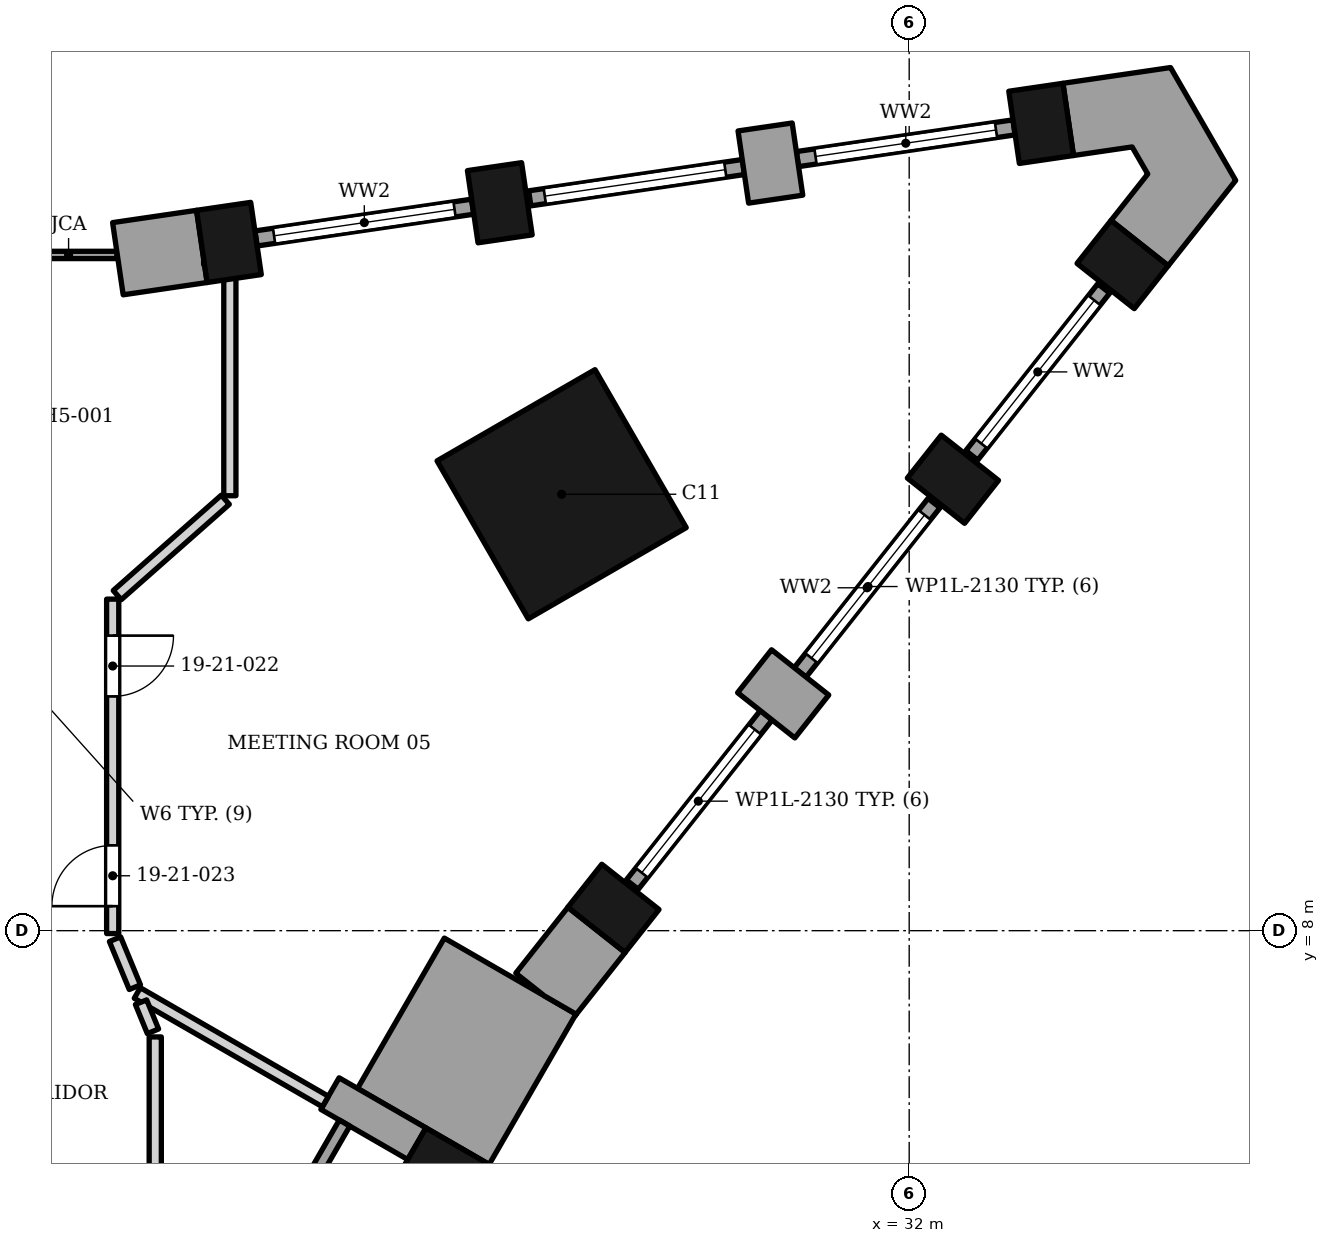
"""IFC4 building model, lengths in metres.
Left out: names, types, materials, properties, quantities, classifications, styles, units other than length and angle.
Written with IfcOpenShell. Run it as: python <this file> out.ifc"""

import sys

from ifc_helpers import new_model, si_unit, direction, frame, frame_2d, origin, origin_2d, place, context, subcontext, project, spatial, polyline, rectangle, outline, extrude, element, fill, save


model = new_model("IFC4")
c1 = context("Model", 3, precision=1e-05, world=origin(), true_north=direction((0.0, 1.0)))
c2 = subcontext(c1, "Body", "Model", "MODEL_VIEW")
j1 = project(units=[si_unit("LENGTHUNIT", "METRE"), si_unit("PLANEANGLEUNIT", "RADIAN")], contexts=[c1])
p1 = place(None, origin())
s1 = spatial("IfcSite", under=j1, at=p1, CompositionType="ELEMENT")
p2 = place(p1, origin())
s2 = spatial("IfcBuilding", under=s1, at=p2, CompositionType="ELEMENT")
p3 = place(p2, frame((0.0, 0.0, 91.8)))
s3 = spatial("IfcBuildingStorey", under=s2, at=p3, CompositionType="ELEMENT", Elevation=91.8)
p4 = place(p3, frame((26.284, 15.177, 0.0), z_axis=(0.0, 0.0, 1.0), x_axis=(-0.866025438691, -0.49999993954, 0.0)))
e1 = element("IfcColumn", 1, at=p4, inside=s3, PredefinedType="COLUMN", context=c2, shape_type="SweptSolid", body=[
    extrude(rectangle(XDim=3.0, YDim=3.0, at=origin_2d()), origin(), (0.0, 0.0, 1.0), 3.4),
])
for number, where, z_axis, x_axis in (
    (2, (24.347, 4.066, 0.0), (0.0, 0.0, 1.0), (0.5, 0.866, 0.0)),
    (3, (27.136, 8.367, 0.0), (0.0, 0.0, 1.0), (0.62, 0.784, 0.0)),
    (4, (32.719, 15.424, 0.0), (0.0, 0.0, 1.0), (0.62, 0.784, 0.0)),
    (5, (35.51, 18.954, 0.0), (0.0, 0.0, 1.0), (0.62, 0.784, 0.0)),
    (6, (34.17, 21.276, 0.0), (0.0, 0.0, 1.0), (-0.989, -0.145, 0.0)),
    (7, (25.267, 19.971, 0.0), (0.0, 0.0, 1.0), (-0.989, -0.145, 0.0)),
    (8, (20.812, 19.318, 0.0), (0.0, 0.0, 1.0), (-0.989, -0.145, 0.0)),
):
    element("IfcColumn", number, at=place(p3, frame(where, z_axis=z_axis, x_axis=x_axis)), inside=s3, PredefinedType="COLUMN", context=c2, shape_type="SweptSolid", body=[
        extrude(rectangle(XDim=0.9, YDim=1.2, at=origin_2d()), origin(), (0.0, 0.0, 1.0), 3.4),
    ])
p5 = place(p3, frame((22.474, 5.321, 0.0), z_axis=(0.0, 0.0, 1.0), x_axis=(0.866040211805, -0.499974350878, 0.0)))
e9 = element("IfcWall", 9, at=p5, inside=s3, PredefinedType="SOLIDWALL", context=c2, shape_type="SweptSolid", body=[
    extrude(rectangle(XDim=1.65, YDim=0.6, at=frame_2d((0.825, 0.0))), origin(), (0.0, 0.0, 1.0), 2.45),
])
p6 = place(p3, frame((20.614, 1.199, 0.0), z_axis=(0.0, 0.0, 1.0), x_axis=(0.500027713859, 0.866009402589, 0.0)))
e10 = element("IfcWall", 10, at=p6, inside=s3, PredefinedType="ELEMENTEDWALL", context=c2, shape_type="SweptSolid", body=[
    extrude(rectangle(XDim=4.2, YDim=0.2, at=frame_2d((2.1, 0.0))), origin(), (0.0, 0.0, 1.0), 2.45),
])
p7 = place(p3, origin())
e11 = element("IfcWall", 11, at=p7, inside=s3, PredefinedType="SOLIDWALL", context=c2, shape_type="SweptSolid", body=[
    extrude(outline(polyline([(22.927, 5.406), (25.092, 4.156), (26.52, 6.628), (24.354, 7.878), (22.927, 5.406)])), origin(), (0.0, 0.0, 1.0), 2.63),
])
p8 = place(p3, frame((30.398, 11.522, 0.0), z_axis=(0.0, 0.0, 1.0), x_axis=(-0.784330409431, 0.620343299184, 0.0)))
e12 = element("IfcWall", 12, at=p8, inside=s3, PredefinedType="SOLIDWALL", context=c2, shape_type="SweptSolid", body=[
    extrude(rectangle(XDim=1.2, YDim=0.9, at=frame_2d((0.6, 0.0))), origin(), (0.0, 0.0, 1.0), 2.63),
])
p9 = place(p3, frame((27.447, 8.757, 0.0), z_axis=(0.0, 0.0, 1.0), x_axis=(0.620259189042, 0.784396926568, 0.0)))
e13 = element("IfcWall", 13, at=p9, inside=s3, PredefinedType="ELEMENTEDWALL", context=c2, shape_type="SweptSolid", body=[
    extrude(rectangle(XDim=3.552, YDim=0.25, at=frame_2d((1.776, 0.0))), origin(), (0.0, 0.0, 1.0), 2.63),
])
p10 = place(p9, frame((0.25, 0.0, 0.3)))
e14 = element("IfcOpeningElement", 14, at=p10, cuts=e13, PredefinedType="OPENING", context=c2, shape_type="SweptSolid", body=[
    extrude(rectangle(XDim=3.0, YDim=2.13, at=frame_2d((1.5, 1.065))), frame((0.0, 0.135, 0.0), z_axis=(0.0, -1.0, 0.0), x_axis=(1.0, 0.0, 0.0)), (0.0, 0.0, 1.0), 0.27),
])
p11 = place(p3, frame((30.206, 12.246, 0.0), z_axis=(0.0, 0.0, 1.0), x_axis=(0.620334919108, 0.784337037335, 0.0)))
e15 = element("IfcWall", 15, at=p11, inside=s3, PredefinedType="ELEMENTEDWALL", context=c2, shape_type="SweptSolid", body=[
    extrude(rectangle(XDim=3.552, YDim=0.25, at=frame_2d((1.776, 0.0))), origin(), (0.0, 0.0, 1.0), 2.63),
])
p12 = place(p11, frame((0.302, 0.0, 0.3)))
e16 = element("IfcOpeningElement", 16, at=p12, cuts=e15, PredefinedType="OPENING", context=c2, shape_type="SweptSolid", body=[
    extrude(rectangle(XDim=3.0, YDim=2.13, at=frame_2d((1.5, 1.065))), frame((0.0, 0.135, 0.0), z_axis=(0.0, -1.0, 0.0), x_axis=(1.0, 0.0, 0.0)), (0.0, 0.0, 1.0), 0.27),
])
p13 = place(p3, frame((33.029, 15.816, 0.0), z_axis=(0.0, 0.0, 1.0), x_axis=(0.620304451578, 0.78436113325, 0.0)))
e17 = element("IfcWall", 17, at=p13, inside=s3, PredefinedType="ELEMENTEDWALL", context=c2, shape_type="SweptSolid", body=[
    extrude(rectangle(XDim=3.5, YDim=0.25, at=frame_2d((1.75, 0.0))), origin(), (0.0, 0.0, 1.0), 2.63),
])
p14 = place(p13, frame((0.25, 0.0, 0.3)))
e18 = element("IfcOpeningElement", 18, at=p14, cuts=e17, PredefinedType="OPENING", context=c2, shape_type="SweptSolid", body=[
    extrude(rectangle(XDim=3.0, YDim=2.13, at=frame_2d((1.5, 1.065))), frame((0.0, 0.135, 0.0), z_axis=(0.0, -1.0, 0.0), x_axis=(1.0, 0.0, 0.0)), (0.0, 0.0, 1.0), 0.27),
])
p15 = place(p3, frame((29.63, 21.217, 0.0), z_axis=(0.0, 0.0, 1.0), x_axis=(0.144867198998, -0.989451107764, 0.0)))
e19 = element("IfcWall", 19, at=p15, inside=s3, PredefinedType="SOLIDWALL", context=c2, shape_type="SweptSolid", body=[
    extrude(rectangle(XDim=1.2, YDim=0.9, at=frame_2d((0.6, 0.0))), origin(), (0.0, 0.0, 1.0), 2.63),
])
p16 = place(p3, frame((33.725, 21.211, 0.0), z_axis=(0.0, 0.0, 1.0), x_axis=(-0.98942335115, -0.145056651687, 0.0)))
e20 = element("IfcWall", 20, at=p16, inside=s3, PredefinedType="ELEMENTEDWALL", context=c2, shape_type="SweptSolid", body=[
    extrude(rectangle(XDim=3.6, YDim=0.25, at=frame_2d((1.8, 0.0))), origin(), (0.0, 0.0, 1.0), 2.63),
])
p17 = place(p16, frame((0.3, 0.0, 0.3)))
e21 = element("IfcOpeningElement", 21, at=p17, cuts=e20, PredefinedType="OPENING", context=c2, shape_type="SweptSolid", body=[
    extrude(rectangle(XDim=3.0, YDim=2.13, at=frame_2d((1.5, 1.065))), frame((0.0, 0.135, 0.0), z_axis=(0.0, -1.0, 0.0), x_axis=(1.0, 0.0, 0.0)), (0.0, 0.0, 1.0), 0.27),
])
p18 = place(p3, frame((29.274, 20.558, 0.0), z_axis=(0.0, 0.0, 1.0), x_axis=(-0.989427410985, -0.145028957081, 0.0)))
e22 = element("IfcWall", 22, at=p18, inside=s3, PredefinedType="ELEMENTEDWALL", context=c2, shape_type="SweptSolid", body=[
    extrude(rectangle(XDim=3.552, YDim=0.25, at=frame_2d((1.776, 0.0))), origin(), (0.0, 0.0, 1.0), 2.63),
])
p19 = place(p18, frame((0.302, 0.0, 0.3)))
e23 = element("IfcOpeningElement", 23, at=p19, cuts=e22, PredefinedType="OPENING", context=c2, shape_type="SweptSolid", body=[
    extrude(rectangle(XDim=3.0, YDim=2.13, at=frame_2d((1.5, 1.065))), frame((0.0, 0.135, 0.0), z_axis=(0.0, -1.0, 0.0), x_axis=(1.0, 0.0, 0.0)), (0.0, 0.0, 1.0), 0.27),
])
p20 = place(p3, frame((24.82, 19.906, 0.0), z_axis=(0.0, 0.0, 1.0), x_axis=(-0.989433082017, -0.144990262464, 0.0)))
e24 = element("IfcWall", 24, at=p20, inside=s3, PredefinedType="ELEMENTEDWALL", context=c2, shape_type="SweptSolid", body=[
    extrude(rectangle(XDim=3.6, YDim=0.25, at=frame_2d((1.8, 0.0))), origin(), (0.0, 0.0, 1.0), 2.63),
])
p21 = place(p20, frame((0.3, 0.0, 0.3)))
e25 = element("IfcOpeningElement", 25, at=p21, cuts=e24, PredefinedType="OPENING", context=c2, shape_type="SweptSolid", body=[
    extrude(rectangle(XDim=3.0, YDim=2.13, at=frame_2d((1.5, 1.065))), frame((0.0, 0.135, 0.0), z_axis=(0.0, -1.0, 0.0), x_axis=(1.0, 0.0, 0.0)), (0.0, 0.0, 1.0), 0.27),
])
p22 = place(p3, origin())
e26 = element("IfcWall", 26, at=p22, inside=s3, PredefinedType="SOLIDWALL", context=c2, shape_type="SweptSolid", body=[
    extrude(outline(polyline([(26.386, 8.384), (25.529, 7.3), (26.0, 6.928), (26.52, 6.628), (26.498, 6.59), (27.328, 7.64), (26.386, 8.384)])), origin(), (0.0, 0.0, 1.0), 2.63),
])
p23 = place(p3, origin())
e27 = element("IfcWall", 27, at=p23, inside=s3, PredefinedType="SOLIDWALL", context=c2, shape_type="SweptSolid", body=[
    extrude(outline(polyline([(35.923, 20.443), (35.319, 19.679), (36.26, 18.935), (37.37, 20.338), (36.298, 22.194), (34.528, 21.935), (34.702, 20.748), (35.666, 20.889), (35.923, 20.443)])), origin(), (0.0, 0.0, 1.0), 2.65),
])
p24 = place(p3, frame((18.986, 19.051, 0.0), z_axis=(0.0, 0.0, 1.0), x_axis=(0.989435994601, 0.144970385211, 0.0)))
e28 = element("IfcWall", 28, at=p24, inside=s3, PredefinedType="SOLIDWALL", context=c2, shape_type="SweptSolid", body=[
    extrude(rectangle(XDim=1.396, YDim=1.2, at=frame_2d((0.698, 0.0))), origin(), (0.0, 0.0, 1.0), 2.65),
])
p25 = place(p3, frame((17.38, 19.113, 0.0), z_axis=(0.0, 0.0, 1.0), x_axis=(1.0, 0.0, 0.0)))
e29 = element("IfcWall", 29, at=p25, inside=s3, PredefinedType="SOLIDWALL", context=c2, shape_type="SweptSolid", body=[
    extrude(rectangle(XDim=1.59, YDim=0.12, at=frame_2d((0.795, 0.0))), origin(), (0.0, 0.0, 1.0), 2.65),
])
p26 = place(p3, frame((19.305, 6.975, 0.0), z_axis=(0.0, 0.0, 1.0), x_axis=(0.866254994177, -0.499602126761, 0.0)))
e30 = element("IfcWall", 30, at=p26, inside=s3, PredefinedType="PARTITIONING", context=c2, shape_type="SweptSolid", body=[
    extrude(rectangle(XDim=3.572, YDim=0.2, at=frame_2d((1.786, 0.0))), origin(), (0.0, 0.0, 1.0), 2.552),
])
p27 = place(p3, frame((19.6, 3.9, 0.0), z_axis=(0.0, 0.0, 1.0), x_axis=(0.000103755965, 0.999999994617, 0.0)))
e31 = element("IfcWall", 31, at=p27, inside=s3, PredefinedType="PARTITIONING", context=c2, shape_type="SweptSolid", body=[
    extrude(rectangle(XDim=2.353, YDim=0.2, at=frame_2d((1.177, 0.0))), origin(), (0.0, 0.0, 1.0), 2.45),
])
p28 = place(p3, frame((19.366, 6.824, 0.0), z_axis=(0.0, 0.0, 1.0), x_axis=(0.378945204734, -0.925419111435, 0.0)))
e32 = element("IfcWall", 32, at=p28, inside=s3, PredefinedType="PARTITIONING", context=c2, shape_type="SweptSolid", body=[
    extrude(rectangle(XDim=0.517, YDim=0.2, at=frame_2d((0.259, 0.0))), origin(), (0.0, 0.0, 1.0), 3.23),
])
p29 = place(p3, frame((18.939, 7.86, 0.0), z_axis=(0.0, 0.0, 1.0), x_axis=(0.382057312896, -0.924138631193, 0.0)))
e33 = element("IfcWall", 33, at=p29, inside=s3, PredefinedType="PARTITIONING", context=c2, shape_type="SweptSolid", body=[
    extrude(rectangle(XDim=0.854, YDim=0.2, at=frame_2d((0.427, 0.0))), origin(), (0.0, 0.0, 1.0), 3.23),
])
p30 = place(p3, frame((18.9, 7.953, 0.0), z_axis=(0.0, 0.0, 1.0), x_axis=(0.0, 1.0, 0.0)))
e34 = element("IfcWall", 34, at=p30, inside=s3, PredefinedType="PARTITIONING", context=c2, shape_type="SweptSolid", body=[
    extrude(rectangle(XDim=5.5, YDim=0.2, at=frame_2d((2.75, 0.0))), origin(), (0.0, 0.0, 1.0), 3.23),
])
p31 = place(p30, frame((3.899, 0.0, 0.0)))
e35 = element("IfcOpeningElement", 35, at=p31, cuts=e34, PredefinedType="OPENING", context=c2, shape_type="SweptSolid", body=[
    extrude(rectangle(XDim=1.0, YDim=2.1, at=frame_2d((0.5, 1.05))), frame((0.0, 0.11, 0.0), z_axis=(0.0, -1.0, 0.0), x_axis=(1.0, 0.0, 0.0)), (0.0, 0.0, 1.0), 0.22),
])
p32 = place(p30, frame((0.45, 0.0, 0.0)))
e36 = element("IfcOpeningElement", 36, at=p32, cuts=e34, PredefinedType="OPENING", context=c2, shape_type="SweptSolid", body=[
    extrude(rectangle(XDim=1.0, YDim=2.1, at=frame_2d((0.5, 1.05))), frame((0.0, 0.11, 0.0), z_axis=(0.0, -1.0, 0.0), x_axis=(1.0, 0.0, 0.0)), (0.0, 0.0, 1.0), 0.22),
])
p33 = place(p3, frame((18.976, 13.519, 0.0), z_axis=(0.0, 0.0, 1.0), x_axis=(0.749825828818, 0.661635266924, 0.0)))
e37 = element("IfcWall", 37, at=p33, inside=s3, PredefinedType="PARTITIONING", context=c2, shape_type="SweptSolid", body=[
    extrude(rectangle(XDim=2.37, YDim=0.2, at=frame_2d((1.185, 0.0))), origin(), (0.0, 0.0, 1.0), 3.23),
])
p34 = place(p3, frame((20.396, 19.053, 0.0), z_axis=(0.0, 0.0, 1.0), x_axis=(1.0, 0.0, 0.0)))
e38 = element("IfcWall", 38, at=p34, inside=s3, PredefinedType="PARTITIONING", context=c2, shape_type="SweptSolid", body=[
    extrude(rectangle(XDim=0.331, YDim=0.2, at=frame_2d((0.166, 0.0))), origin(), (0.0, 0.0, 1.0), 3.23),
])
p35 = place(p3, frame((20.827, 19.053, 0.0), z_axis=(0.0, 0.0, 1.0), x_axis=(0.0, -1.0, 0.0)))
e39 = element("IfcWall", 39, at=p35, inside=s3, PredefinedType="PARTITIONING", context=c2, shape_type="SweptSolid", body=[
    extrude(rectangle(XDim=3.9, YDim=0.2, at=frame_2d((1.95, 0.0))), origin(), (0.0, 0.0, 1.0), 3.23),
])
p36 = place(p10, origin())
e40 = element("IfcWindow", 40, at=p36, inside=s3, PartitioningType="SINGLE_PANEL", PredefinedType="WINDOW", context=c2, shape_type="SweptSolid", body=[
    extrude(rectangle(XDim=3.0, YDim=2.13, at=frame_2d((1.5, 1.065))), frame((0.0, 0.03, 0.0), z_axis=(0.0, -1.0, 0.0), x_axis=(1.0, 0.0, 0.0)), (0.0, 0.0, 1.0), 0.06),
])
fill(e14, e40)
p37 = place(p12, origin())
e41 = element("IfcWindow", 41, at=p37, inside=s3, PartitioningType="SINGLE_PANEL", PredefinedType="WINDOW", context=c2, shape_type="SweptSolid", body=[
    extrude(rectangle(XDim=3.0, YDim=2.13, at=frame_2d((1.5, 1.065))), frame((0.0, 0.03, 0.0), z_axis=(0.0, -1.0, 0.0), x_axis=(1.0, 0.0, 0.0)), (0.0, 0.0, 1.0), 0.06),
])
fill(e16, e41)
p38 = place(p14, origin())
e42 = element("IfcWindow", 42, at=p38, inside=s3, PartitioningType="SINGLE_PANEL", PredefinedType="WINDOW", context=c2, shape_type="SweptSolid", body=[
    extrude(rectangle(XDim=3.0, YDim=2.13, at=frame_2d((1.5, 1.065))), frame((0.0, 0.03, 0.0), z_axis=(0.0, -1.0, 0.0), x_axis=(1.0, 0.0, 0.0)), (0.0, 0.0, 1.0), 0.06),
])
fill(e18, e42)
p39 = place(p17, origin())
e43 = element("IfcWindow", 43, at=p39, inside=s3, PartitioningType="SINGLE_PANEL", PredefinedType="WINDOW", context=c2, shape_type="SweptSolid", body=[
    extrude(rectangle(XDim=3.0, YDim=2.13, at=frame_2d((1.5, 1.065))), frame((0.0, 0.03, 0.0), z_axis=(0.0, -1.0, 0.0), x_axis=(1.0, 0.0, 0.0)), (0.0, 0.0, 1.0), 0.06),
])
fill(e21, e43)
p40 = place(p19, origin())
e44 = element("IfcWindow", 44, at=p40, inside=s3, PartitioningType="SINGLE_PANEL", PredefinedType="WINDOW", context=c2, shape_type="SweptSolid", body=[
    extrude(rectangle(XDim=3.0, YDim=2.13, at=frame_2d((1.5, 1.065))), frame((0.0, 0.03, 0.0), z_axis=(0.0, -1.0, 0.0), x_axis=(1.0, 0.0, 0.0)), (0.0, 0.0, 1.0), 0.06),
])
fill(e23, e44)
p41 = place(p21, origin())
e45 = element("IfcWindow", 45, at=p41, inside=s3, PartitioningType="SINGLE_PANEL", PredefinedType="WINDOW", context=c2, shape_type="SweptSolid", body=[
    extrude(rectangle(XDim=3.0, YDim=2.13, at=frame_2d((1.5, 1.065))), frame((0.0, 0.03, 0.0), z_axis=(0.0, -1.0, 0.0), x_axis=(1.0, 0.0, 0.0)), (0.0, 0.0, 1.0), 0.06),
])
fill(e25, e45)
p42 = place(p31, origin())
e46 = element("IfcDoor", 46, at=p42, inside=s3, OperationType="SINGLE_SWING_RIGHT", PredefinedType="DOOR", context=c2, shape_type="SweptSolid", body=[
    extrude(rectangle(XDim=1.0, YDim=2.1, at=frame_2d((0.5, 1.05))), frame((0.0, 0.025, 0.0), z_axis=(0.0, -1.0, 0.0), x_axis=(1.0, 0.0, 0.0)), (0.0, 0.0, 1.0), 0.05),
])
fill(e35, e46)
p43 = place(p32, origin())
e47 = element("IfcDoor", 47, at=p43, inside=s3, OperationType="SINGLE_SWING_LEFT", PredefinedType="DOOR", context=c2, shape_type="SweptSolid", body=[
    extrude(rectangle(XDim=1.0, YDim=2.1, at=frame_2d((0.5, 1.05))), frame((0.0, 0.025, 0.0), z_axis=(0.0, -1.0, 0.0), x_axis=(1.0, 0.0, 0.0)), (0.0, 0.0, 1.0), 0.05),
])
fill(e36, e47)
save(model, sys.argv[1])
